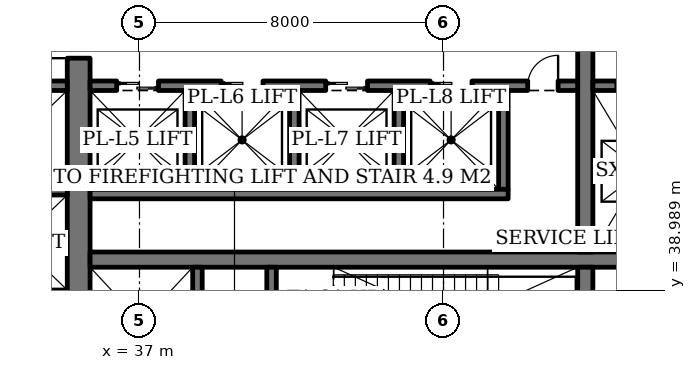
"""IFC4 building model, lengths in metres.
Left out: names, types, materials, properties, quantities, classifications, styles, units other than length and angle.
Written with IfcOpenShell. Run it as: python <this file> out.ifc"""

import sys

from ifc_helpers import new_model, si_unit, direction, frame, frame_2d, origin, place, context, subcontext, project, spatial, rectangle, extrude, element, fill, save


model = new_model("IFC4")
c1 = context("Model", 3, precision=1e-05, world=origin(), true_north=direction((0.0, 1.0)))
c2 = subcontext(c1, "Body", "Model", "MODEL_VIEW")
j1 = project(units=[si_unit("LENGTHUNIT", "METRE"), si_unit("PLANEANGLEUNIT", "RADIAN")], contexts=[c1])
p1 = place(None, origin())
s1 = spatial("IfcSite", under=j1, at=p1, CompositionType="ELEMENT")
p2 = place(p1, origin())
s2 = spatial("IfcBuilding", under=s1, at=p2, CompositionType="ELEMENT")
p3 = place(p2, frame((0.0, 0.0, 6.0)))
s3 = spatial("IfcBuildingStorey", under=s2, at=p3, CompositionType="ELEMENT", Elevation=6.0)
p4 = place(p3, frame((35.4, 36.7, 0.0), z_axis=(0.0, 0.0, 1.0), x_axis=(0.0, 1.0, 0.0)))
e1 = element("IfcWall", 1, at=p4, inside=s3, PredefinedType="SHEAR", context=c2, shape_type="SweptSolid", body=[
    extrude(rectangle(XDim=18.6, YDim=0.6, at=frame_2d((9.3, 0.0))), origin(), (0.0, 0.0, 1.0), 5.0),
])
p5 = place(p4, frame((8.4, 0.0, 0.0)))
e2 = element("IfcOpeningElement", 2, at=p5, cuts=e1, PredefinedType="OPENING", context=c2, shape_type="SweptSolid", body=[
    extrude(rectangle(XDim=1.8, YDim=2.4, at=frame_2d((0.9, 1.2))), frame((0.0, 0.31, 0.0), z_axis=(0.0, -1.0, 0.0), x_axis=(1.0, 0.0, 0.0)), (0.0, 0.0, 1.0), 0.62),
])
p6 = place(p3, frame((35.7, 39.8, 0.0), z_axis=(0.0, 0.0, 1.0), x_axis=(1.0, 0.0, 0.0)))
e3 = element("IfcWall", 3, at=p6, inside=s3, PredefinedType="SHEAR", context=c2, shape_type="SweptSolid", body=[
    extrude(rectangle(XDim=18.6, YDim=0.4, at=frame_2d((9.3, 0.0))), origin(), (0.0, 0.0, 1.0), 5.0),
])
p7 = place(p3, frame((48.73, 36.7, 0.0), z_axis=(0.0, 0.0, 1.0), x_axis=(0.0, 1.0, 0.0)))
e4 = element("IfcWall", 4, at=p7, inside=s3, PredefinedType="SHEAR", context=c2, shape_type="SweptSolid", body=[
    extrude(rectangle(XDim=2.9, YDim=0.4, at=frame_2d((1.45, 0.0))), origin(), (0.0, 0.0, 1.0), 5.0),
])
p8 = place(p3, frame((48.73, 40.0, 0.0), z_axis=(0.0, 0.0, 1.0), x_axis=(0.0, 1.0, 0.0)))
e5 = element("IfcWall", 5, at=p8, inside=s3, PredefinedType="SHEAR", context=c2, shape_type="SweptSolid", body=[
    extrude(rectangle(XDim=12.0, YDim=0.4, at=frame_2d((6.0, 0.0))), origin(), (0.0, 0.0, 1.0), 5.0),
])
p9 = place(p3, frame((38.525, 36.7, 0.0), z_axis=(0.0, 0.0, 1.0), x_axis=(0.0, 1.0, 0.0)))
e6 = element("IfcWall", 6, at=p9, inside=s3, PredefinedType="SHEAR", context=c2, shape_type="SweptSolid", body=[
    extrude(rectangle(XDim=2.9, YDim=0.25, at=frame_2d((1.45, 0.0))), origin(), (0.0, 0.0, 1.0), 5.0),
])
p10 = place(p9, frame((0.8, 0.0, 0.0)))
e7 = element("IfcOpeningElement", 7, at=p10, cuts=e6, PredefinedType="OPENING", context=c2, shape_type="SweptSolid", body=[
    extrude(rectangle(XDim=1.3, YDim=2.2, at=frame_2d((0.65, 1.1))), frame((0.0, 0.135, 0.0), z_axis=(0.0, -1.0, 0.0), x_axis=(1.0, 0.0, 0.0)), (0.0, 0.0, 1.0), 0.27),
])
p11 = place(p3, frame((40.475, 36.7, 0.0), z_axis=(0.0, 0.0, 1.0), x_axis=(0.0, 1.0, 0.0)))
e8 = element("IfcWall", 8, at=p11, inside=s3, PredefinedType="SHEAR", context=c2, shape_type="SweptSolid", body=[
    extrude(rectangle(XDim=2.9, YDim=0.25, at=frame_2d((1.45, 0.0))), origin(), (0.0, 0.0, 1.0), 5.0),
])
p12 = place(p11, frame((0.75, 0.0, 0.0)))
e9 = element("IfcOpeningElement", 9, at=p12, cuts=e8, PredefinedType="OPENING", context=c2, shape_type="SweptSolid", body=[
    extrude(rectangle(XDim=1.2, YDim=2.1, at=frame_2d((0.6, 1.05))), frame((0.0, 0.135, 0.0), z_axis=(0.0, -1.0, 0.0), x_axis=(1.0, 0.0, 0.0)), (0.0, 0.0, 1.0), 0.27),
])
for number, where, z_axis, x_axis in (
    (10, (38.325, 44.25, 0.0), (0.0, 0.0, 1.0), (0.0, -1.0, 0.0)),
    (11, (41.075, 44.25, 0.0), (0.0, 0.0, 1.0), (0.0, -1.0, 0.0)),
    (12, (43.825, 44.25, 0.0), (0.0, 0.0, 1.0), (0.0, -1.0, 0.0)),
    (13, (46.575, 44.25, 0.0), (0.0, 0.0, 1.0), (0.0, -1.0, 0.0)),
):
    element("IfcWall", number, at=place(p3, frame(where, z_axis=z_axis, x_axis=x_axis)), inside=s3, PredefinedType="SHEAR", context=c2, shape_type="SweptSolid", body=[
        extrude(rectangle(XDim=2.6, YDim=0.25, at=frame_2d((1.3, 0.0))), origin(), (0.0, 0.0, 1.0), 5.0),
    ])
p13 = place(p3, frame((35.7, 41.525, 0.0), z_axis=(0.0, 0.0, 1.0), x_axis=(1.0, 0.0, 0.0)))
e14 = element("IfcWall", 14, at=p13, inside=s3, PredefinedType="SHEAR", context=c2, shape_type="SweptSolid", body=[
    extrude(rectangle(XDim=11.0, YDim=0.25, at=frame_2d((5.5, 0.0))), origin(), (0.0, 0.0, 1.0), 5.0),
])
p14 = place(p3, frame((35.7, 44.375, 0.0), z_axis=(0.0, 0.0, 1.0), x_axis=(1.0, 0.0, 0.0)))
e15 = element("IfcWall", 15, at=p14, inside=s3, PredefinedType="SHEAR", context=c2, shape_type="SweptSolid", body=[
    extrude(rectangle(XDim=12.83, YDim=0.25, at=frame_2d((6.415, 0.0))), origin(), (0.0, 0.0, 1.0), 5.0),
])
p15 = place(p14, frame((0.7, 0.0, 0.0)))
e16 = element("IfcOpeningElement", 16, at=p15, cuts=e15, PredefinedType="OPENING", context=c2, shape_type="SweptSolid", body=[
    extrude(rectangle(XDim=1.1, YDim=2.2, at=frame_2d((0.55, 1.1))), frame((0.0, 0.135, 0.0), z_axis=(0.0, -1.0, 0.0), x_axis=(1.0, 0.0, 0.0)), (0.0, 0.0, 1.0), 0.27),
])
p16 = place(p14, frame((3.45, 0.0, 0.0)))
e17 = element("IfcOpeningElement", 17, at=p16, cuts=e15, PredefinedType="OPENING", context=c2, shape_type="SweptSolid", body=[
    extrude(rectangle(XDim=1.1, YDim=2.2, at=frame_2d((0.55, 1.1))), frame((0.0, 0.135, 0.0), z_axis=(0.0, -1.0, 0.0), x_axis=(1.0, 0.0, 0.0)), (0.0, 0.0, 1.0), 0.27),
])
p17 = place(p14, frame((6.2, 0.0, 0.0)))
e18 = element("IfcOpeningElement", 18, at=p17, cuts=e15, PredefinedType="OPENING", context=c2, shape_type="SweptSolid", body=[
    extrude(rectangle(XDim=1.1, YDim=2.2, at=frame_2d((0.55, 1.1))), frame((0.0, 0.135, 0.0), z_axis=(0.0, -1.0, 0.0), x_axis=(1.0, 0.0, 0.0)), (0.0, 0.0, 1.0), 0.27),
])
p18 = place(p14, frame((8.95, 0.0, 0.0)))
e19 = element("IfcOpeningElement", 19, at=p18, cuts=e15, PredefinedType="OPENING", context=c2, shape_type="SweptSolid", body=[
    extrude(rectangle(XDim=1.1, YDim=2.2, at=frame_2d((0.55, 1.1))), frame((0.0, 0.135, 0.0), z_axis=(0.0, -1.0, 0.0), x_axis=(1.0, 0.0, 0.0)), (0.0, 0.0, 1.0), 0.27),
])
p19 = place(p14, frame((11.515, 0.0, 0.0)))
e20 = element("IfcOpeningElement", 20, at=p19, cuts=e15, PredefinedType="OPENING", context=c2, shape_type="SweptSolid", body=[
    extrude(rectangle(XDim=0.8, YDim=2.0, at=frame_2d((0.4, 1.0))), frame((0.0, 0.135, 0.0), z_axis=(0.0, -1.0, 0.0), x_axis=(1.0, 0.0, 0.0)), (0.0, 0.0, 1.0), 0.27),
])
p20 = place(p3, frame((48.93, 44.375, 0.0), z_axis=(0.0, 0.0, 1.0), x_axis=(1.0, 0.0, 0.0)))
e21 = element("IfcWall", 21, at=p20, inside=s3, PredefinedType="SHEAR", context=c2, shape_type="SweptSolid", body=[
    extrude(rectangle(XDim=5.37, YDim=0.25, at=frame_2d((2.685, 0.0))), origin(), (0.0, 0.0, 1.0), 5.0),
])
p21 = place(p20, frame((0.63, 0.0, 0.0)))
e22 = element("IfcOpeningElement", 22, at=p21, cuts=e21, PredefinedType="OPENING", context=c2, shape_type="SweptSolid", body=[
    extrude(rectangle(XDim=1.3, YDim=2.2, at=frame_2d((0.65, 1.1))), frame((0.0, 0.135, 0.0), z_axis=(0.0, -1.0, 0.0), x_axis=(1.0, 0.0, 0.0)), (0.0, 0.0, 1.0), 0.27),
])
p22 = place(p20, frame((3.44, 0.0, 0.0)))
e23 = element("IfcOpeningElement", 23, at=p22, cuts=e21, PredefinedType="OPENING", context=c2, shape_type="SweptSolid", body=[
    extrude(rectangle(XDim=1.3, YDim=2.2, at=frame_2d((0.65, 1.1))), frame((0.0, 0.135, 0.0), z_axis=(0.0, -1.0, 0.0), x_axis=(1.0, 0.0, 0.0)), (0.0, 0.0, 1.0), 0.27),
])
for number, where, z_axis, x_axis in (
    (24, (32.5, 41.625, 0.0), (0.0, 0.0, 1.0), (1.0, 0.0, 0.0)),
    (25, (32.5, 44.375, 0.0), (0.0, 0.0, 1.0), (1.0, 0.0, 0.0)),
):
    element("IfcWall", number, at=place(p3, frame(where, z_axis=z_axis, x_axis=x_axis)), inside=s3, PredefinedType="SHEAR", context=c2, shape_type="SweptSolid", body=[
        extrude(rectangle(XDim=2.6, YDim=0.25, at=frame_2d((1.3, 0.0))), origin(), (0.0, 0.0, 1.0), 5.0),
    ])
p23 = place(p15, origin())
e26 = element("IfcDoor", 26, at=p23, inside=s3, OperationType="DOUBLE_DOOR_SLIDING", PredefinedType="DOOR", context=c2, shape_type="SweptSolid", body=[
    extrude(rectangle(XDim=1.1, YDim=2.2, at=frame_2d((0.55, 1.1))), frame((0.0, 0.025, 0.0), z_axis=(0.0, -1.0, 0.0), x_axis=(1.0, 0.0, 0.0)), (0.0, 0.0, 1.0), 0.05),
])
fill(e16, e26)
p24 = place(p16, origin())
e27 = element("IfcDoor", 27, at=p24, inside=s3, OperationType="DOUBLE_DOOR_SLIDING", PredefinedType="DOOR", context=c2, shape_type="SweptSolid", body=[
    extrude(rectangle(XDim=1.1, YDim=2.2, at=frame_2d((0.55, 1.1))), frame((0.0, 0.025, 0.0), z_axis=(0.0, -1.0, 0.0), x_axis=(1.0, 0.0, 0.0)), (0.0, 0.0, 1.0), 0.05),
])
fill(e17, e27)
p25 = place(p17, origin())
e28 = element("IfcDoor", 28, at=p25, inside=s3, OperationType="DOUBLE_DOOR_SLIDING", PredefinedType="DOOR", context=c2, shape_type="SweptSolid", body=[
    extrude(rectangle(XDim=1.1, YDim=2.2, at=frame_2d((0.55, 1.1))), frame((0.0, 0.025, 0.0), z_axis=(0.0, -1.0, 0.0), x_axis=(1.0, 0.0, 0.0)), (0.0, 0.0, 1.0), 0.05),
])
fill(e18, e28)
p26 = place(p18, origin())
e29 = element("IfcDoor", 29, at=p26, inside=s3, OperationType="DOUBLE_DOOR_SLIDING", PredefinedType="DOOR", context=c2, shape_type="SweptSolid", body=[
    extrude(rectangle(XDim=1.1, YDim=2.2, at=frame_2d((0.55, 1.1))), frame((0.0, 0.025, 0.0), z_axis=(0.0, -1.0, 0.0), x_axis=(1.0, 0.0, 0.0)), (0.0, 0.0, 1.0), 0.05),
])
fill(e19, e29)
p27 = place(p19, origin())
e30 = element("IfcDoor", 30, at=p27, inside=s3, OperationType="SINGLE_SWING_RIGHT", PredefinedType="DOOR", context=c2, shape_type="SweptSolid", body=[
    extrude(rectangle(XDim=0.8, YDim=2.0, at=frame_2d((0.4, 1.0))), frame((0.0, 0.025, 0.0), z_axis=(0.0, -1.0, 0.0), x_axis=(1.0, 0.0, 0.0)), (0.0, 0.0, 1.0), 0.05),
])
fill(e20, e30)
p28 = place(p5, origin())
e31 = element("IfcDoor", 31, at=p28, inside=s3, OperationType="DOUBLE_DOOR_SINGLE_SWING", PredefinedType="DOOR", context=c2, shape_type="SweptSolid", body=[
    extrude(rectangle(XDim=1.8, YDim=2.4, at=frame_2d((0.9, 1.2))), frame((0.0, 0.025, 0.0), z_axis=(0.0, -1.0, 0.0), x_axis=(1.0, 0.0, 0.0)), (0.0, 0.0, 1.0), 0.05),
])
fill(e2, e31)
save(model, sys.argv[1])
